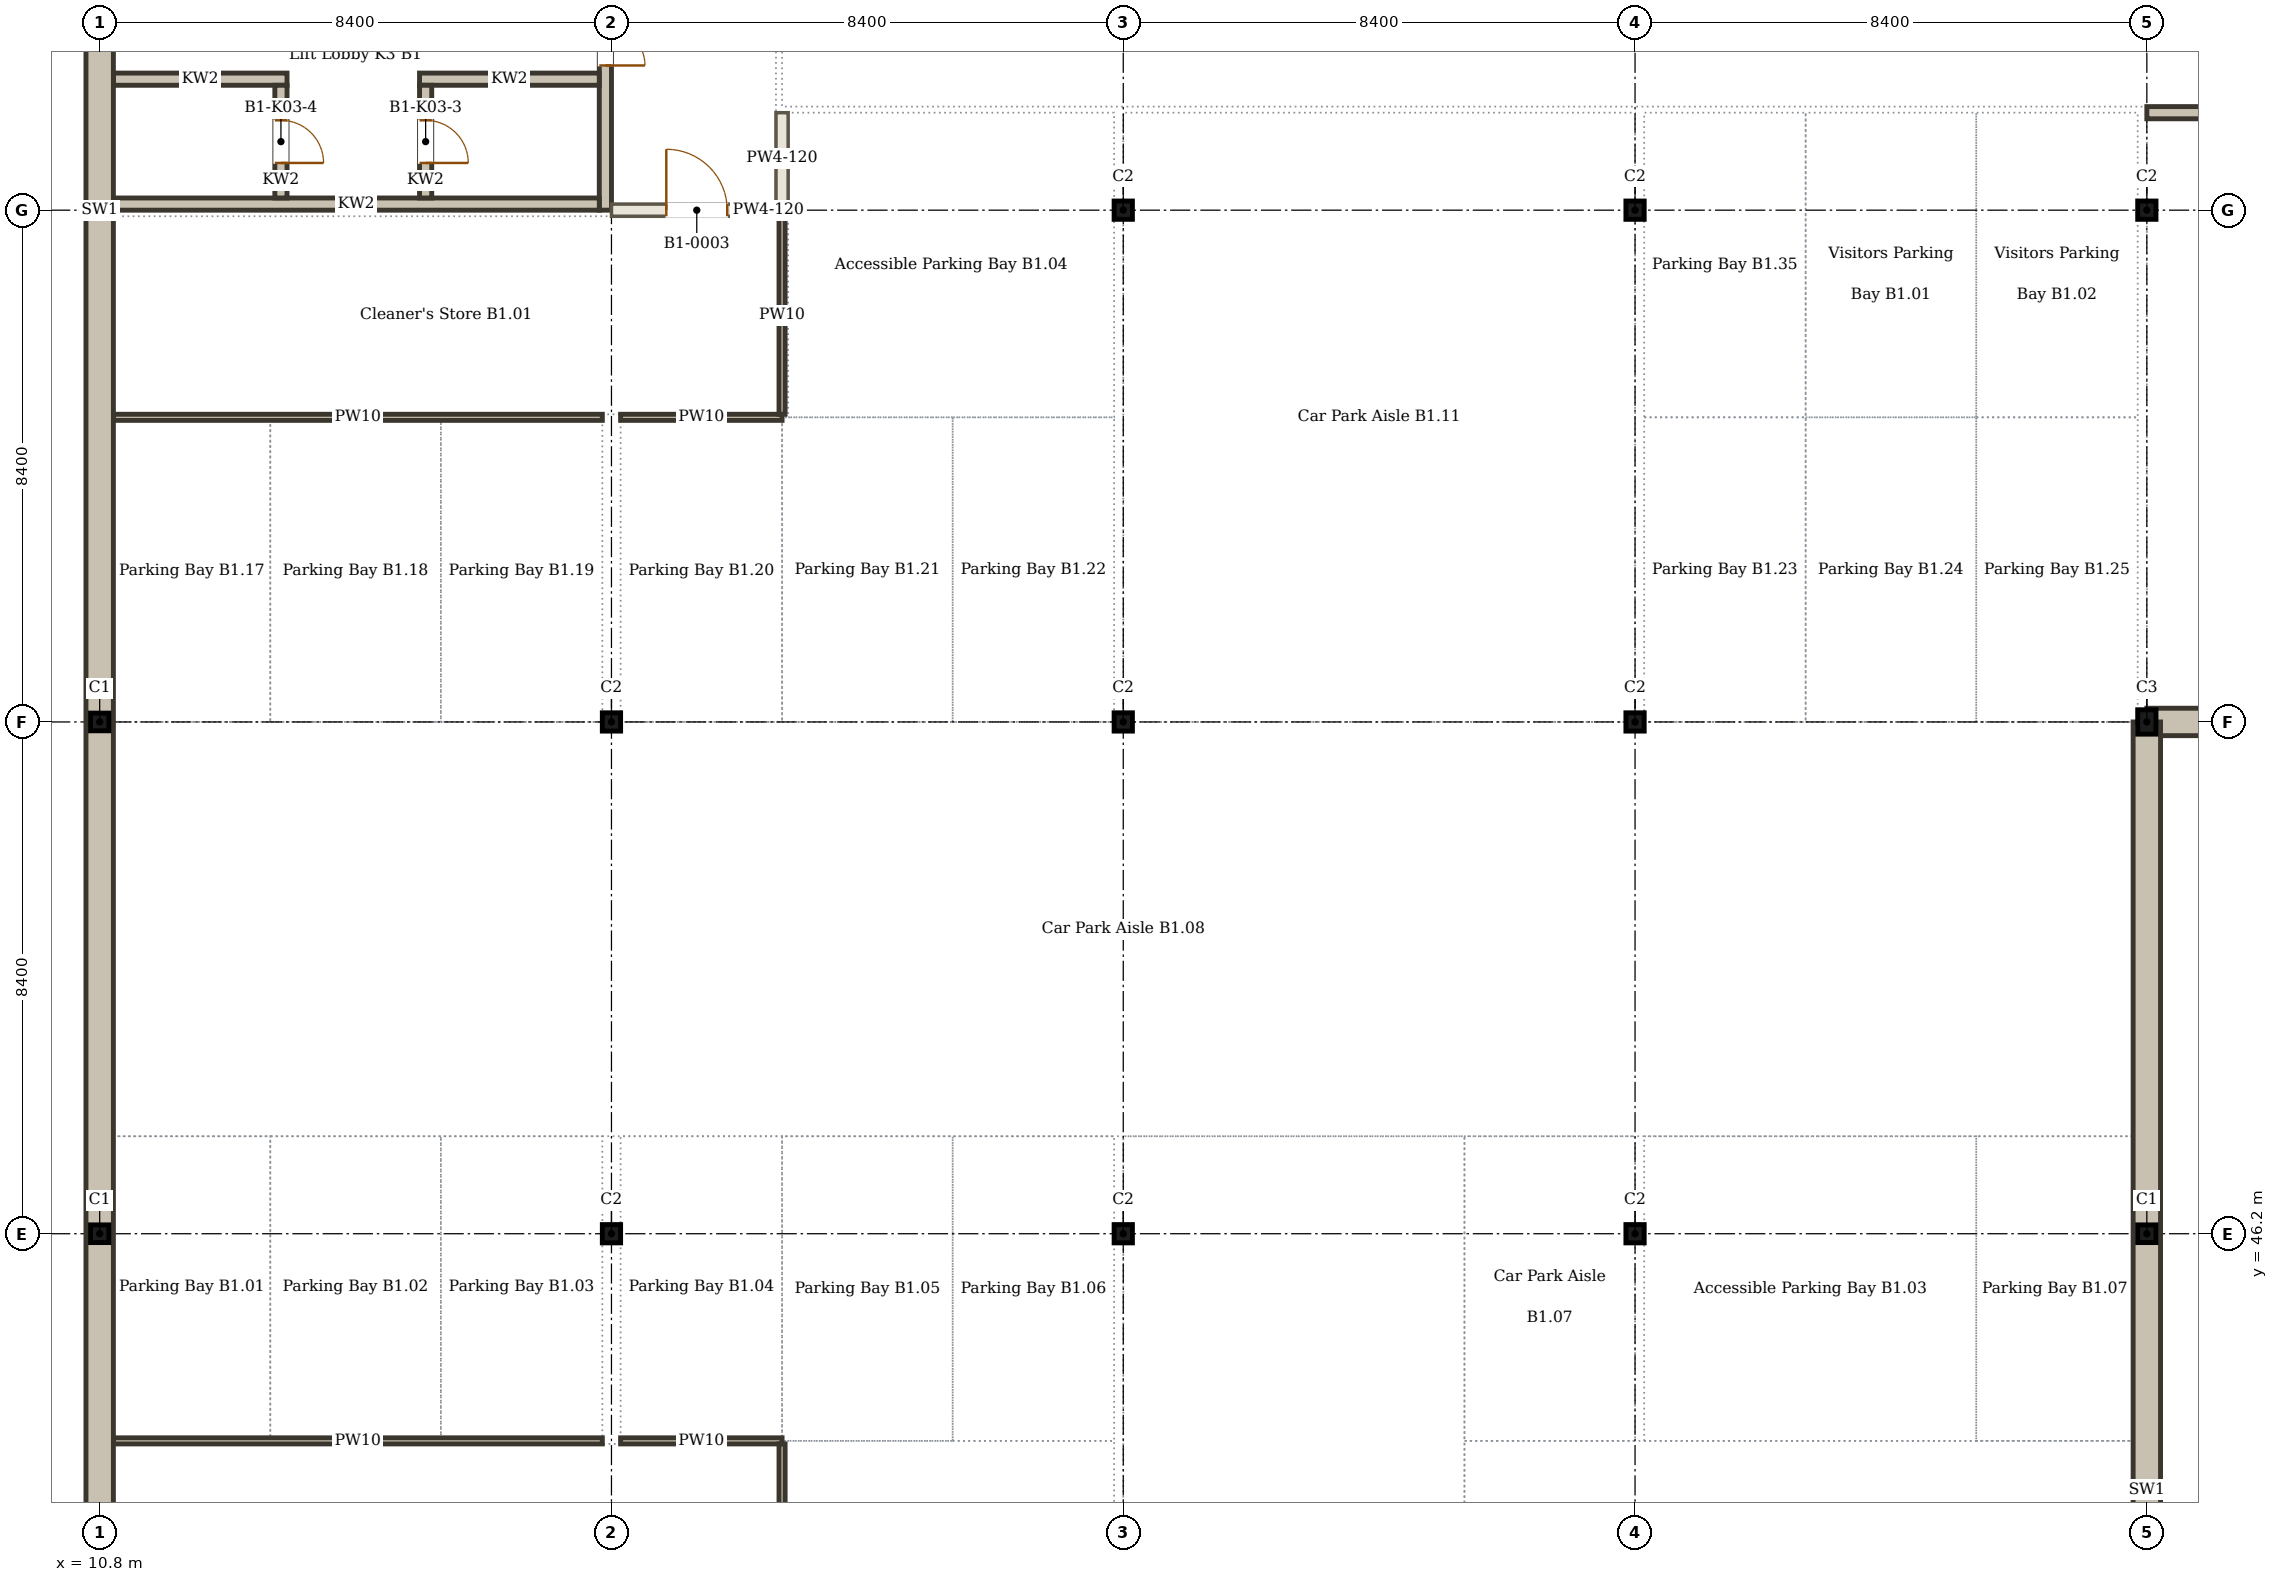
"""IFC4 building model, lengths in metres.
Left out: names, types, materials, properties, quantities, classifications, styles, units other than length and angle.
Written with IfcOpenShell. Run it as: python <this file> out.ifc"""

import sys

from ifc_helpers import new_model, si_unit, direction, frame, frame_2d, origin, origin_2d, place, context, subcontext, project, spatial, rectangle, i_section, extrude, element, fill, save


model = new_model("IFC4")
c1 = context("Model", 3, precision=1e-05, world=origin(), true_north=direction((0.0, 1.0)))
c2 = subcontext(c1, "Body", "Model", "MODEL_VIEW")
j1 = project(units=[si_unit("LENGTHUNIT", "METRE"), si_unit("PLANEANGLEUNIT", "RADIAN")], contexts=[c1])
p1 = place(None, origin())
s1 = spatial("IfcSite", under=j1, at=p1, CompositionType="ELEMENT")
p2 = place(p1, origin())
s2 = spatial("IfcBuilding", under=s1, at=p2, CompositionType="ELEMENT")
p3 = place(p2, frame((0.0, 0.0, -4.5)))
s3 = spatial("IfcBuildingStorey", under=s2, at=p3, CompositionType="ELEMENT", Elevation=-4.5)
p4 = place(p3, frame((10.8, 46.2, 0.0), z_axis=(0.0, 0.0, 1.0), x_axis=(1.0, 0.0, 0.0)))
e1 = element("IfcColumn", 1, at=p4, inside=s3, PredefinedType="COLUMN", context=c2, shape_type="SweptSolid", body=[
    extrude(i_section(OverallWidth=0.3, OverallDepth=0.29, WebThickness=0.009, FlangeThickness=0.014, FilletRadius=0.027, at=origin_2d()), origin(), (0.0, 0.0, 1.0), 4.5),
])
for number, where, z_axis, x_axis in (
    (2, (19.2, 46.2, 0.0), (0.0, 0.0, 1.0), (1.0, 0.0, 0.0)),
    (3, (27.6, 46.2, 0.0), (0.0, 0.0, 1.0), (1.0, 0.0, 0.0)),
    (4, (36.0, 46.2, 0.0), (0.0, 0.0, 1.0), (1.0, 0.0, 0.0)),
):
    element("IfcColumn", number, at=place(p3, frame(where, z_axis=z_axis, x_axis=x_axis)), inside=s3, PredefinedType="COLUMN", context=c2, shape_type="SweptSolid", body=[
        extrude(i_section(OverallWidth=0.3, OverallDepth=0.3, WebThickness=0.011, FlangeThickness=0.019, FilletRadius=0.027, at=origin_2d()), origin(), (0.0, 0.0, 1.0), 4.5),
    ])
for number, where, z_axis, x_axis in (
    (5, (44.4, 46.2, 0.0), (0.0, 0.0, 1.0), (1.0, 0.0, 0.0)),
    (6, (10.8, 54.6, 0.0), (0.0, 0.0, 1.0), (1.0, 0.0, 0.0)),
):
    element("IfcColumn", number, at=place(p3, frame(where, z_axis=z_axis, x_axis=x_axis)), inside=s3, PredefinedType="COLUMN", context=c2, shape_type="SweptSolid", body=[
        extrude(i_section(OverallWidth=0.3, OverallDepth=0.29, WebThickness=0.009, FlangeThickness=0.014, FilletRadius=0.027, at=origin_2d()), origin(), (0.0, 0.0, 1.0), 4.5),
    ])
for number, where, z_axis, x_axis in (
    (7, (19.2, 54.6, 0.0), (0.0, 0.0, 1.0), (1.0, 0.0, 0.0)),
    (8, (27.6, 54.6, 0.0), (0.0, 0.0, 1.0), (1.0, 0.0, 0.0)),
    (9, (36.0, 54.6, 0.0), (0.0, 0.0, 1.0), (1.0, 0.0, 0.0)),
):
    element("IfcColumn", number, at=place(p3, frame(where, z_axis=z_axis, x_axis=x_axis)), inside=s3, PredefinedType="COLUMN", context=c2, shape_type="SweptSolid", body=[
        extrude(i_section(OverallWidth=0.3, OverallDepth=0.3, WebThickness=0.011, FlangeThickness=0.019, FilletRadius=0.027, at=origin_2d()), origin(), (0.0, 0.0, 1.0), 4.5),
    ])
p5 = place(p3, frame((44.4, 54.6, 0.0), z_axis=(0.0, 0.0, 1.0), x_axis=(1.0, 0.0, 0.0)))
e10 = element("IfcColumn", 10, at=p5, inside=s3, PredefinedType="COLUMN", context=c2, shape_type="SweptSolid", body=[
    extrude(i_section(OverallWidth=0.3, OverallDepth=0.4, WebThickness=0.013, FlangeThickness=0.024, FilletRadius=0.027, at=origin_2d()), origin(), (0.0, 0.0, 1.0), 4.5),
])
for number, where, z_axis, x_axis in (
    (11, (27.6, 63.0, 0.0), (0.0, 0.0, 1.0), (1.0, 0.0, 0.0)),
    (12, (36.0, 63.0, 0.0), (0.0, 0.0, 1.0), (1.0, 0.0, 0.0)),
    (13, (44.4, 63.0, 0.0), (0.0, 0.0, 1.0), (1.0, 0.0, 0.0)),
):
    element("IfcColumn", number, at=place(p3, frame(where, z_axis=z_axis, x_axis=x_axis)), inside=s3, PredefinedType="COLUMN", context=c2, shape_type="SweptSolid", body=[
        extrude(i_section(OverallWidth=0.3, OverallDepth=0.3, WebThickness=0.011, FlangeThickness=0.019, FilletRadius=0.027, at=origin_2d()), origin(), (0.0, 0.0, 1.0), 4.5),
    ])
for number, where, z_axis, x_axis in (
    (14, (44.4, 54.6, 0.0), (0.0, 0.0, 1.0), (1.0, 0.0, 0.0)),
    (15, (10.8, 96.6, 0.0), (0.0, 0.0, 1.0), (0.0, -1.0, 0.0)),
):
    element("IfcWall", number, at=place(p3, frame(where, z_axis=z_axis, x_axis=x_axis)), inside=s3, PredefinedType="SOLIDWALL", context=c2, shape_type="SweptSolid", body=[
        extrude(rectangle(XDim=67.2, YDim=0.45, at=frame_2d((33.6, 0.0))), origin(), (0.0, 0.0, 1.0), 4.35),
    ])
p6 = place(p3, frame((44.4, 29.4, 0.0), z_axis=(0.0, 0.0, 1.0), x_axis=(0.0, 1.0, 0.0)))
e16 = element("IfcWall", 16, at=p6, inside=s3, PredefinedType="SOLIDWALL", context=c2, shape_type="SweptSolid", body=[
    extrude(rectangle(XDim=25.2, YDim=0.45, at=frame_2d((12.6, 0.0))), origin(), (0.0, 0.0, 1.0), 4.35),
])
p7 = place(p3, frame((11.025, 42.8, 0.0), z_axis=(0.0, 0.0, 1.0), x_axis=(1.0, 0.0, 0.0)))
e17 = element("IfcWall", 17, at=p7, inside=s3, PredefinedType="SOLIDWALL", context=c2, shape_type="SweptSolid", body=[
    extrude(rectangle(XDim=8.025, YDim=0.1, at=frame_2d((4.013, 0.0))), origin(), (0.0, 0.0, 1.0), 3.95),
])
p8 = place(p3, frame((19.35, 42.8, 0.0), z_axis=(0.0, 0.0, 1.0), x_axis=(1.0, 0.0, 0.0)))
e18 = element("IfcWall", 18, at=p8, inside=s3, PredefinedType="SOLIDWALL", context=c2, shape_type="SweptSolid", body=[
    extrude(rectangle(XDim=2.65, YDim=0.1, at=frame_2d((1.325, 0.0))), origin(), (0.0, 0.0, 1.0), 3.95),
])
p9 = place(p3, frame((11.025, 59.6, 0.0), z_axis=(0.0, 0.0, 1.0), x_axis=(1.0, 0.0, 0.0)))
e19 = element("IfcWall", 19, at=p9, inside=s3, PredefinedType="SOLIDWALL", context=c2, shape_type="SweptSolid", body=[
    extrude(rectangle(XDim=8.025, YDim=0.1, at=frame_2d((4.013, 0.0))), origin(), (0.0, 0.0, 1.0), 3.95),
])
p10 = place(p3, frame((19.35, 59.6, 0.0), z_axis=(0.0, 0.0, 1.0), x_axis=(1.0, 0.0, 0.0)))
e20 = element("IfcWall", 20, at=p10, inside=s3, PredefinedType="SOLIDWALL", context=c2, shape_type="SweptSolid", body=[
    extrude(rectangle(XDim=2.65, YDim=0.1, at=frame_2d((1.325, 0.0))), origin(), (0.0, 0.0, 1.0), 3.95),
])
p11 = place(p3, frame((19.2, 63.0, 0.0), z_axis=(0.0, 0.0, 1.0), x_axis=(1.0, 0.0, 0.0)))
e21 = element("IfcWall", 21, at=p11, inside=s3, PredefinedType="PARTITIONING", context=c2, shape_type="SweptSolid", body=[
    extrude(rectangle(XDim=2.8, YDim=0.2, at=frame_2d((1.4, 0.0))), origin(), (0.0, 0.0, 1.0), 3.8),
])
p12 = place(p11, frame((0.9, 0.0, 0.0)))
e22 = element("IfcOpeningElement", 22, at=p12, cuts=e21, PredefinedType="OPENING", context=c2, shape_type="SweptSolid", body=[
    extrude(rectangle(XDim=1.0, YDim=2.1, at=frame_2d((0.5, 1.05))), frame((0.0, 0.11, 0.0), z_axis=(0.0, -1.0, 0.0), x_axis=(1.0, 0.0, 0.0)), (0.0, 0.0, 1.0), 0.22),
])
p13 = place(p3, frame((44.4, 64.6, 0.0), z_axis=(0.0, 0.0, 1.0), x_axis=(1.0, 0.0, 0.0)))
e23 = element("IfcWall", 23, at=p13, inside=s3, PredefinedType="SOLIDWALL", context=c2, shape_type="SweptSolid", body=[
    extrude(rectangle(XDim=67.2, YDim=0.2, at=frame_2d((33.6, 0.0))), origin(), (0.0, 0.0, 1.0), 3.8),
])
p14 = place(p13, frame((3.2, 0.0, 0.0)))
e24 = element("IfcOpeningElement", 24, at=p14, cuts=e23, PredefinedType="OPENING", context=c2, shape_type="SweptSolid", body=[
    extrude(rectangle(XDim=1.0, YDim=2.1, at=frame_2d((0.5, 1.05))), frame((0.0, 0.11, 0.0), z_axis=(0.0, -1.0, 0.0), x_axis=(1.0, 0.0, 0.0)), (0.0, 0.0, 1.0), 0.22),
])
p15 = place(p13, frame((21.0, 0.0, 0.0)))
e25 = element("IfcOpeningElement", 25, at=p15, cuts=e23, PredefinedType="OPENING", context=c2, shape_type="SweptSolid", body=[
    extrude(rectangle(XDim=1.0, YDim=2.1, at=frame_2d((0.5, 1.05))), frame((0.0, 0.11, 0.0), z_axis=(0.0, -1.0, 0.0), x_axis=(1.0, 0.0, 0.0)), (0.0, 0.0, 1.0), 0.22),
])
p16 = place(p13, frame((28.9, 0.0, 0.0)))
e26 = element("IfcOpeningElement", 26, at=p16, cuts=e23, PredefinedType="OPENING", context=c2, shape_type="SweptSolid", body=[
    extrude(rectangle(XDim=1.0, YDim=2.1, at=frame_2d((0.5, 1.05))), frame((0.0, 0.11, 0.0), z_axis=(0.0, -1.0, 0.0), x_axis=(1.0, 0.0, 0.0)), (0.0, 0.0, 1.0), 0.22),
])
p17 = place(p13, frame((36.8, 0.0, 0.0)))
e27 = element("IfcOpeningElement", 27, at=p17, cuts=e23, PredefinedType="OPENING", context=c2, shape_type="SweptSolid", body=[
    extrude(rectangle(XDim=1.0, YDim=2.1, at=frame_2d((0.5, 1.05))), frame((0.0, 0.11, 0.0), z_axis=(0.0, -1.0, 0.0), x_axis=(1.0, 0.0, 0.0)), (0.0, 0.0, 1.0), 0.22),
])
p18 = place(p13, frame((54.5, 0.0, 0.0)))
e28 = element("IfcOpeningElement", 28, at=p18, cuts=e23, PredefinedType="OPENING", context=c2, shape_type="SweptSolid", body=[
    extrude(rectangle(XDim=1.0, YDim=2.1, at=frame_2d((0.5, 1.05))), frame((0.0, 0.11, 0.0), z_axis=(0.0, -1.0, 0.0), x_axis=(1.0, 0.0, 0.0)), (0.0, 0.0, 1.0), 0.22),
])
p19 = place(p13, frame((62.5, 0.0, 0.0)))
e29 = element("IfcOpeningElement", 29, at=p19, cuts=e23, PredefinedType="OPENING", context=c2, shape_type="SweptSolid", body=[
    extrude(rectangle(XDim=1.0, YDim=2.1, at=frame_2d((0.5, 1.05))), frame((0.0, 0.11, 0.0), z_axis=(0.0, -1.0, 0.0), x_axis=(1.0, 0.0, 0.0)), (0.0, 0.0, 1.0), 0.22),
])
p20 = place(p3, frame((22.0, 37.9, 0.0), z_axis=(0.0, 0.0, 1.0), x_axis=(0.0, 1.0, 0.0)))
e30 = element("IfcWall", 30, at=p20, inside=s3, PredefinedType="SOLIDWALL", context=c2, shape_type="SweptSolid", body=[
    extrude(rectangle(XDim=4.85, YDim=0.1, at=frame_2d((2.425, 0.0))), origin(), (0.0, 0.0, 1.0), 3.8),
])
p21 = place(p3, frame((22.0, 59.65, 0.0), z_axis=(0.0, 0.0, 1.0), x_axis=(0.0, 1.0, 0.0)))
e31 = element("IfcWall", 31, at=p21, inside=s3, PredefinedType="SOLIDWALL", context=c2, shape_type="SweptSolid", body=[
    extrude(rectangle(XDim=3.25, YDim=0.1, at=frame_2d((1.625, 0.0))), origin(), (0.0, 0.0, 1.0), 3.8),
])
p22 = place(p3, frame((22.0, 63.1, 0.0), z_axis=(0.0, 0.0, 1.0), x_axis=(0.0, 1.0, 0.0)))
e32 = element("IfcWall", 32, at=p22, inside=s3, PredefinedType="PARTITIONING", context=c2, shape_type="SweptSolid", body=[
    extrude(rectangle(XDim=1.5, YDim=0.2, at=frame_2d((0.75, 0.0))), origin(), (0.0, 0.0, 1.0), 3.8),
])
p23 = place(p3, frame((19.1, 71.4, 0.0), z_axis=(0.0, 0.0, 1.0), x_axis=(0.0, -1.0, 0.0)))
e33 = element("IfcWall", 33, at=p23, inside=s3, PredefinedType="SOLIDWALL", context=c2, shape_type="SweptSolid", body=[
    extrude(rectangle(XDim=8.4, YDim=0.2, at=frame_2d((4.2, 0.0))), origin(), (0.0, 0.0, 1.0), 4.5),
])
p24 = place(p23, frame((4.725, 0.0, 0.0)))
e34 = element("IfcOpeningElement", 34, at=p24, cuts=e33, PredefinedType="OPENING", context=c2, shape_type="SweptSolid", body=[
    extrude(rectangle(XDim=1.3, YDim=2.1, at=frame_2d((0.65, 1.05))), frame((0.0, 0.11, 0.0), z_axis=(0.0, -1.0, 0.0), x_axis=(1.0, 0.0, 0.0)), (0.0, 0.0, 1.0), 0.22),
])
p25 = place(p3, frame((19.0, 63.1, 0.0), z_axis=(0.0, 0.0, 1.0), x_axis=(-1.0, 0.0, 0.0)))
e35 = element("IfcWall", 35, at=p25, inside=s3, PredefinedType="SOLIDWALL", context=c2, shape_type="SweptSolid", body=[
    extrude(rectangle(XDim=7.975, YDim=0.2, at=frame_2d((3.988, 0.0))), origin(), (0.0, 0.0, 1.0), 4.5),
])
p26 = place(p3, frame((19.0, 65.15, 0.0), z_axis=(0.0, 0.0, 1.0), x_axis=(-1.0, 0.0, 0.0)))
e36 = element("IfcWall", 36, at=p26, inside=s3, PredefinedType="SOLIDWALL", context=c2, shape_type="SweptSolid", body=[
    extrude(rectangle(XDim=2.95, YDim=0.2, at=frame_2d((1.475, 0.0))), origin(), (0.0, 0.0, 1.0), 4.35),
])
p27 = place(p3, frame((13.875, 65.15, 0.0), z_axis=(0.0, 0.0, 1.0), x_axis=(-1.0, 0.0, 0.0)))
e37 = element("IfcWall", 37, at=p27, inside=s3, PredefinedType="SOLIDWALL", context=c2, shape_type="SweptSolid", body=[
    extrude(rectangle(XDim=2.85, YDim=0.2, at=frame_2d((1.425, 0.0))), origin(), (0.0, 0.0, 1.0), 4.35),
])
p28 = place(p3, frame((16.15, 65.05, 0.0), z_axis=(0.0, 0.0, 1.0), x_axis=(0.0, -1.0, 0.0)))
e38 = element("IfcWall", 38, at=p28, inside=s3, PredefinedType="SOLIDWALL", context=c2, shape_type="SweptSolid", body=[
    extrude(rectangle(XDim=1.85, YDim=0.2, at=frame_2d((0.925, 0.0))), origin(), (0.0, 0.0, 1.0), 4.35),
])
p29 = place(p28, frame((0.575, 0.0, 0.0)))
e39 = element("IfcOpeningElement", 39, at=p29, cuts=e38, PredefinedType="OPENING", context=c2, shape_type="SweptSolid", body=[
    extrude(rectangle(XDim=0.7, YDim=2.1, at=frame_2d((0.35, 1.05))), frame((0.0, 0.11, 0.0), z_axis=(0.0, -1.0, 0.0), x_axis=(1.0, 0.0, 0.0)), (0.0, 0.0, 1.0), 0.22),
])
p30 = place(p3, frame((13.775, 65.05, 0.0), z_axis=(0.0, 0.0, 1.0), x_axis=(0.0, -1.0, 0.0)))
e40 = element("IfcWall", 40, at=p30, inside=s3, PredefinedType="SOLIDWALL", context=c2, shape_type="SweptSolid", body=[
    extrude(rectangle(XDim=1.85, YDim=0.2, at=frame_2d((0.925, 0.0))), origin(), (0.0, 0.0, 1.0), 4.35),
])
p31 = place(p30, frame((0.575, 0.0, 0.0)))
e41 = element("IfcOpeningElement", 41, at=p31, cuts=e40, PredefinedType="OPENING", context=c2, shape_type="SweptSolid", body=[
    extrude(rectangle(XDim=0.7, YDim=2.1, at=frame_2d((0.35, 1.05))), frame((0.0, 0.11, 0.0), z_axis=(0.0, -1.0, 0.0), x_axis=(1.0, 0.0, 0.0)), (0.0, 0.0, 1.0), 0.22),
])
p32 = place(p12, origin())
e42 = element("IfcDoor", 42, at=p32, inside=s3, OperationType="SINGLE_SWING_LEFT", PredefinedType="DOOR", context=c2, shape_type="SweptSolid", body=[
    extrude(rectangle(XDim=1.0, YDim=2.1, at=frame_2d((0.5, 1.05))), frame((0.0, 0.025, 0.0), z_axis=(0.0, -1.0, 0.0), x_axis=(1.0, 0.0, 0.0)), (0.0, 0.0, 1.0), 0.05),
])
fill(e22, e42)
p33 = place(p24, origin())
e43 = element("IfcDoor", 43, at=p33, inside=s3, OperationType="DOUBLE_DOOR_DOUBLE_SWING", PredefinedType="DOOR", context=c2, shape_type="SweptSolid", body=[
    extrude(rectangle(XDim=1.3, YDim=2.1, at=frame_2d((0.65, 1.05))), frame((0.0, 0.025, 0.0), z_axis=(0.0, -1.0, 0.0), x_axis=(1.0, 0.0, 0.0)), (0.0, 0.0, 1.0), 0.05),
])
fill(e34, e43)
p34 = place(p29, origin())
e44 = element("IfcDoor", 44, at=p34, inside=s3, OperationType="SINGLE_SWING_RIGHT", PredefinedType="DOOR", context=c2, shape_type="SweptSolid", body=[
    extrude(rectangle(XDim=0.7, YDim=2.1, at=frame_2d((0.35, 1.05))), frame((0.0, 0.025, 0.0), z_axis=(0.0, -1.0, 0.0), x_axis=(1.0, 0.0, 0.0)), (0.0, 0.0, 1.0), 0.05),
])
fill(e39, e44)
p35 = place(p31, origin())
e45 = element("IfcDoor", 45, at=p35, inside=s3, OperationType="SINGLE_SWING_RIGHT", PredefinedType="DOOR", context=c2, shape_type="SweptSolid", body=[
    extrude(rectangle(XDim=0.7, YDim=2.1, at=frame_2d((0.35, 1.05))), frame((0.0, 0.025, 0.0), z_axis=(0.0, -1.0, 0.0), x_axis=(1.0, 0.0, 0.0)), (0.0, 0.0, 1.0), 0.05),
])
fill(e41, e45)
save(model, sys.argv[1])
